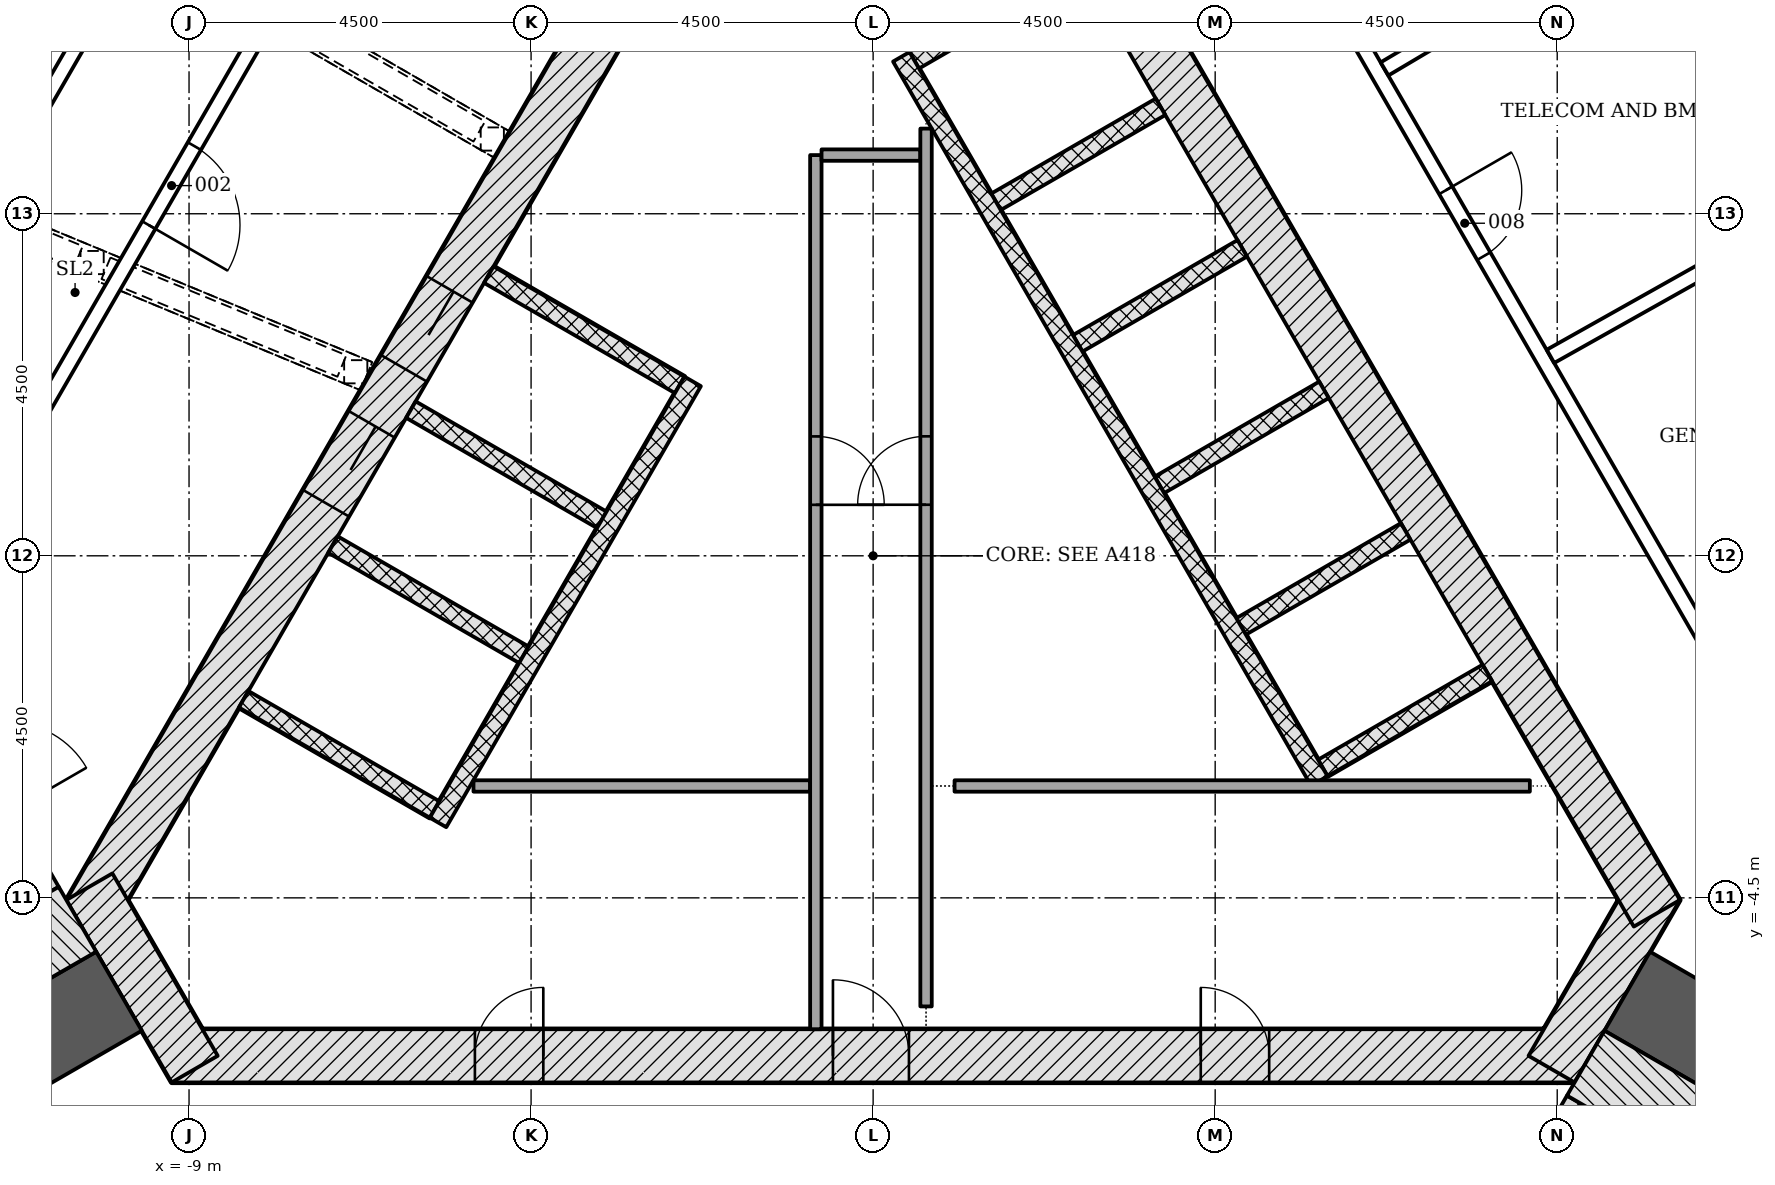
"""IFC4 building model, lengths in metres.
Left out: names, types, materials, properties, quantities, classifications, styles, units other than length and angle.
Written with IfcOpenShell. Run it as: python <this file> out.ifc"""

import sys

from ifc_helpers import new_model, si_unit, direction, frame, frame_2d, origin, place, context, subcontext, project, spatial, rectangle, extrude, element, fill, save


model = new_model("IFC4")
c1 = context("Model", 3, precision=1e-05, world=origin(), true_north=direction((0.0, 1.0)))
c2 = subcontext(c1, "Body", "Model", "MODEL_VIEW")
j1 = project(units=[si_unit("LENGTHUNIT", "METRE"), si_unit("PLANEANGLEUNIT", "RADIAN")], contexts=[c1])
p1 = place(None, origin())
s1 = spatial("IfcSite", under=j1, at=p1, CompositionType="ELEMENT")
p2 = place(p1, origin())
s2 = spatial("IfcBuilding", under=s1, at=p2, CompositionType="ELEMENT")
p3 = place(p2, frame((0.0, 0.0, 258.0)))
s3 = spatial("IfcBuildingStorey", under=s2, at=p3, CompositionType="ELEMENT", Elevation=258.0)
p4 = place(p3, frame((-9.229, -6.578, -0.3), z_axis=(0.0, 0.0, 1.0), x_axis=(1.0, 0.0, 0.0)))
e1 = element("IfcWall", 1, at=p4, inside=s3, PredefinedType="SHEAR", context=c2, shape_type="SweptSolid", body=[
    extrude(rectangle(XDim=18.458, YDim=0.7, at=frame_2d((9.229, 0.0))), origin(), (0.0, 0.0, 1.0), 5.5),
])
p5 = place(p4, frame((8.7, 0.0, 0.3)))
e2 = element("IfcOpeningElement", 2, at=p5, cuts=e1, PredefinedType="OPENING", context=c2, shape_type="SweptSolid", body=[
    extrude(rectangle(XDim=1.0, YDim=2.1, at=frame_2d((0.5, 1.05))), frame((0.0, 0.36, 0.0), z_axis=(0.0, -1.0, 0.0), x_axis=(1.0, 0.0, 0.0)), (0.0, 0.0, 1.0), 0.72),
])
p6 = place(p4, frame((3.99, 0.0, 0.3)))
e3 = element("IfcOpeningElement", 3, at=p6, cuts=e1, PredefinedType="OPENING", context=c2, shape_type="SweptSolid", body=[
    extrude(rectangle(XDim=0.9, YDim=2.1, at=frame_2d((0.45, 1.05))), frame((0.0, 0.36, 0.0), z_axis=(0.0, -1.0, 0.0), x_axis=(1.0, 0.0, 0.0)), (0.0, 0.0, 1.0), 0.72),
])
p7 = place(p4, frame((13.539, 0.0, 0.3)))
e4 = element("IfcOpeningElement", 4, at=p7, cuts=e1, PredefinedType="OPENING", context=c2, shape_type="SweptSolid", body=[
    extrude(rectangle(XDim=0.9, YDim=2.1, at=frame_2d((0.45, 1.05))), frame((0.0, 0.36, 0.0), z_axis=(0.0, -1.0, 0.0), x_axis=(1.0, 0.0, 0.0)), (0.0, 0.0, 1.0), 0.72),
])
p8 = place(p3, frame((8.926, -6.753, -0.3), z_axis=(0.0, 0.0, 1.0), x_axis=(0.500042739161, 0.866000726912, 0.0)))
e5 = element("IfcWall", 5, at=p8, inside=s3, PredefinedType="SHEAR", context=c2, shape_type="SweptSolid", body=[
    extrude(rectangle(XDim=2.771, YDim=0.7, at=frame_2d((1.386, 0.0))), origin(), (0.0, 0.0, 1.0), 5.5),
])
p9 = place(p3, frame((10.311, -4.703, -0.3), z_axis=(0.0, 0.0, 1.0), x_axis=(-0.500001446645, 0.866024568562, 0.0)))
e6 = element("IfcWall", 6, at=p9, inside=s3, PredefinedType="SHEAR", context=c2, shape_type="SweptSolid", body=[
    extrude(rectangle(XDim=18.458, YDim=0.7, at=frame_2d((9.229, 0.0))), origin(), (0.0, 0.0, 1.0), 5.5),
])
p10 = place(p3, frame((-1.083, 11.281, -0.3), z_axis=(0.0, 0.0, 1.0), x_axis=(-0.500001446645, -0.866024568562, 0.0)))
e7 = element("IfcWall", 7, at=p10, inside=s3, PredefinedType="SHEAR", context=c2, shape_type="SweptSolid", body=[
    extrude(rectangle(XDim=18.458, YDim=0.7, at=frame_2d((9.229, 0.0))), origin(), (0.0, 0.0, 1.0), 5.5),
])
p11 = place(p10, frame((8.979, 0.0, 0.3)))
e8 = element("IfcOpeningElement", 8, at=p11, cuts=e7, PredefinedType="OPENING", context=c2, shape_type="SweptSolid", body=[
    extrude(rectangle(XDim=1.2, YDim=2.1, at=frame_2d((0.6, 1.05))), frame((0.0, 0.36, 0.0), z_axis=(0.0, -1.0, 0.0), x_axis=(1.0, 0.0, 0.0)), (0.0, 0.0, 1.0), 0.72),
])
p12 = place(p10, frame((11.029, 0.0, 0.3)))
e9 = element("IfcOpeningElement", 9, at=p12, cuts=e7, PredefinedType="OPENING", context=c2, shape_type="SweptSolid", body=[
    extrude(rectangle(XDim=1.2, YDim=2.1, at=frame_2d((0.6, 1.05))), frame((0.0, 0.36, 0.0), z_axis=(0.0, -1.0, 0.0), x_axis=(1.0, 0.0, 0.0)), (0.0, 0.0, 1.0), 0.72),
])
p13 = place(p3, frame((-10.311, -4.353, -0.3), z_axis=(0.0, 0.0, 1.0), x_axis=(0.500042739161, -0.866000726912, 0.0)))
e10 = element("IfcWall", 10, at=p13, inside=s3, PredefinedType="SHEAR", context=c2, shape_type="SweptSolid", body=[
    extrude(rectangle(XDim=2.771, YDim=0.7, at=frame_2d((1.386, 0.0))), origin(), (0.0, 0.0, 1.0), 5.5),
])
for number, where, z_axis, x_axis in (
    (11, (-9.922, -5.728, -0.3), (0.0, 0.0, 1.0), (-0.866, -0.5, 0.0)),
    (12, (9.922, -5.728, -0.3), (0.0, 0.0, 1.0), (0.866, -0.5, 0.0)),
):
    element("IfcWall", number, at=place(p3, frame(where, z_axis=z_axis, x_axis=x_axis)), inside=s3, PredefinedType="SHEAR", context=c2, shape_type="SweptSolid", body=[
        extrude(rectangle(XDim=6.678, YDim=1.2, at=frame_2d((3.339, 0.0))), origin(), (0.0, 0.0, 1.0), 5.5),
    ])
for number, where, z_axis, x_axis in (
    (13, (8.081, -1.541, -0.3), (0.0, 0.0, 1.0), (-0.866, -0.5, 0.0)),
    (14, (7.006, 0.321, -0.3), (0.0, 0.0, 1.0), (-0.866, -0.5, 0.0)),
):
    element("IfcWall", number, at=place(p3, frame(where, z_axis=z_axis, x_axis=x_axis)), inside=s3, PredefinedType="PARTITIONING", context=c2, shape_type="SweptSolid", body=[
        extrude(rectangle(XDim=2.5, YDim=0.25, at=frame_2d((1.25, 0.0))), origin(), (0.0, 0.0, 1.0), 5.5),
    ])
p14 = place(p3, frame((5.931, 2.183, -0.3), z_axis=(0.0, 0.0, 1.0), x_axis=(-0.866047370643, -0.499961950354, 0.0)))
e15 = element("IfcWall", 15, at=p14, inside=s3, PredefinedType="PARTITIONING", context=c2, shape_type="SweptSolid", body=[
    extrude(rectangle(XDim=2.5, YDim=0.25, at=frame_2d((1.25, 0.0))), origin(), (0.0, 0.0, 1.0), 5.5),
])
for number, where, z_axis, x_axis in (
    (16, (4.856, 4.045, -0.3), (0.0, 0.0, 1.0), (-0.866, -0.5, 0.0)),
    (17, (3.781, 5.907, -0.3), (0.0, 0.0, 1.0), (-0.866, -0.5, 0.0)),
    (18, (2.706, 7.769, -0.3), (0.0, 0.0, 1.0), (-0.866, -0.5, 0.0)),
):
    element("IfcWall", number, at=place(p3, frame(where, z_axis=z_axis, x_axis=x_axis)), inside=s3, PredefinedType="PARTITIONING", context=c2, shape_type="SweptSolid", body=[
        extrude(rectangle(XDim=2.5, YDim=0.25, at=frame_2d((1.25, 0.0))), origin(), (0.0, 0.0, 1.0), 5.5),
    ])
p15 = place(p3, frame((5.87, -2.961, 0.0), z_axis=(0.0, 0.0, 1.0), x_axis=(-0.50000615651, 0.866021849293, 0.0)))
e19 = element("IfcWall", 19, at=p15, inside=s3, PredefinedType="PARTITIONING", context=c2, shape_type="SweptSolid", body=[
    extrude(rectangle(XDim=11.0, YDim=0.25, at=frame_2d((5.5, 0.0))), origin(), (0.0, 0.0, 1.0), 5.2),
])
for number, where, z_axis, x_axis in (
    (20, (-5.056, 3.699, -0.3), (0.0, 0.0, 1.0), (0.866, -0.5, 0.0)),
    (21, (-6.081, 1.923, -0.3), (0.0, 0.0, 1.0), (0.866, -0.5, 0.0)),
    (22, (-7.106, 0.148, -0.3), (0.0, 0.0, 1.0), (0.866, -0.5, 0.0)),
    (23, (-8.281, -1.887, -0.3), (0.0, 0.0, 1.0), (0.866, -0.5, 0.0)),
):
    element("IfcWall", number, at=place(p3, frame(where, z_axis=z_axis, x_axis=x_axis)), inside=s3, PredefinedType="PARTITIONING", context=c2, shape_type="SweptSolid", body=[
        extrude(rectangle(XDim=2.9, YDim=0.25, at=frame_2d((1.45, 0.0))), origin(), (0.0, 0.0, 1.0), 5.5),
    ])
p16 = place(p3, frame((-2.374, 2.294, 0.0), z_axis=(0.0, 0.0, 1.0), x_axis=(-0.500003174267, -0.866023571113, 0.0)))
e24 = element("IfcWall", 24, at=p16, inside=s3, PredefinedType="PARTITIONING", context=c2, shape_type="SweptSolid", body=[
    extrude(rectangle(XDim=6.7, YDim=0.25, at=frame_2d((3.35, 0.0))), origin(), (0.0, 0.0, 1.0), 5.2),
])
p17 = place(p3, frame((-5.258, -3.028, 0.0), z_axis=(0.0, 0.0, 1.0), x_axis=(1.0, 0.0, 0.0)))
e25 = element("IfcWall", 25, at=p17, inside=s3, PredefinedType="PARTITIONING", context=c2, shape_type="SweptSolid", body=[
    extrude(rectangle(XDim=4.429, YDim=0.15, at=frame_2d((2.215, 0.0))), origin(), (0.0, 0.0, 1.0), 5.2),
])
p18 = place(p3, frame((-0.754, 5.272, 0.0), z_axis=(0.0, 0.0, 1.0), x_axis=(0.0, -1.0, 0.0)))
e26 = element("IfcWall", 26, at=p18, inside=s3, PredefinedType="PARTITIONING", context=c2, shape_type="SweptSolid", body=[
    extrude(rectangle(XDim=11.5, YDim=0.15, at=frame_2d((5.75, 0.0))), origin(), (0.0, 0.0, 1.0), 5.2),
])
p19 = place(p18, frame((3.701, 0.0, 0.0)))
e27 = element("IfcOpeningElement", 27, at=p19, cuts=e26, PredefinedType="OPENING", context=c2, shape_type="SweptSolid", body=[
    extrude(rectangle(XDim=0.9, YDim=2.1, at=frame_2d((0.45, 1.05))), frame((0.0, 0.085, 0.0), z_axis=(0.0, -1.0, 0.0), x_axis=(1.0, 0.0, 0.0)), (0.0, 0.0, 1.0), 0.17),
])
p20 = place(p3, frame((-0.679, 5.272, 0.0), z_axis=(0.0, 0.0, 1.0), x_axis=(1.0, 0.0, 0.0)))
e28 = element("IfcWall", 28, at=p20, inside=s3, PredefinedType="PARTITIONING", context=c2, shape_type="SweptSolid", body=[
    extrude(rectangle(XDim=1.3, YDim=0.15, at=frame_2d((0.65, 0.0))), origin(), (0.0, 0.0, 1.0), 5.2),
])
p21 = place(p3, frame((0.696, -5.928, 0.0), z_axis=(0.0, 0.0, 1.0), x_axis=(0.0, 1.0, 0.0)))
e29 = element("IfcWall", 29, at=p21, inside=s3, PredefinedType="PARTITIONING", context=c2, shape_type="SweptSolid", body=[
    extrude(rectangle(XDim=11.549, YDim=0.15, at=frame_2d((5.774, 0.0))), origin(), (0.0, 0.0, 1.0), 5.2),
])
p22 = place(p21, frame((6.6, 0.0, 0.0)))
e30 = element("IfcOpeningElement", 30, at=p22, cuts=e29, PredefinedType="OPENING", context=c2, shape_type="SweptSolid", body=[
    extrude(rectangle(XDim=0.9, YDim=2.1, at=frame_2d((0.45, 1.05))), frame((0.0, 0.085, 0.0), z_axis=(0.0, -1.0, 0.0), x_axis=(1.0, 0.0, 0.0)), (0.0, 0.0, 1.0), 0.17),
])
p23 = place(p3, frame((1.071, -3.028, 0.0), z_axis=(0.0, 0.0, 1.0), x_axis=(1.0, 0.0, 0.0)))
e31 = element("IfcWall", 31, at=p23, inside=s3, PredefinedType="PARTITIONING", context=c2, shape_type="SweptSolid", body=[
    extrude(rectangle(XDim=7.569, YDim=0.15, at=frame_2d((3.784, 0.0))), origin(), (0.0, 0.0, 1.0), 5.2),
])
p24 = place(p3, frame((-12.576, -1.331, -0.3), z_axis=(0.0, 0.0, 1.0), x_axis=(0.499970499736, -0.8660424351, 0.0)))
e32 = element("IfcWall", 32, at=p24, inside=s3, PredefinedType="SHEAR", context=c2, shape_type="SweptSolid", body=[
    extrude(rectangle(XDim=3.55, YDim=0.2, at=frame_2d((1.775, 0.0))), origin(), (0.0, 0.0, 1.0), 5.5),
])
p25 = place(p24, frame((1.175, 0.0, 0.3)))
e33 = element("IfcOpeningElement", 33, at=p25, cuts=e32, PredefinedType="OPENING", context=c2, shape_type="SweptSolid", body=[
    extrude(rectangle(XDim=1.2, YDim=2.1, at=frame_2d((0.6, 1.05))), frame((0.0, 0.11, 0.0), z_axis=(0.0, -1.0, 0.0), x_axis=(1.0, 0.0, 0.0)), (0.0, 0.0, 1.0), 0.22),
])
p26 = place(p3, frame((-10.468, -4.782, -0.3), z_axis=(0.0, 0.0, 1.0), x_axis=(-0.866016347338, -0.500015685897, 0.0)))
e34 = element("IfcWall", 34, at=p26, inside=s3, PredefinedType="SHEAR", context=c2, shape_type="SweptSolid", body=[
    extrude(rectangle(XDim=6.678, YDim=0.986, at=frame_2d((3.339, 0.0))), origin(), (0.0, 0.0, 1.0), 5.5),
])
p27 = place(p3, frame((7.44, -10.226, -0.3), z_axis=(0.0, 0.0, 1.0), x_axis=(0.500022077904, 0.866012656725, 0.0)))
e35 = element("IfcWall", 35, at=p27, inside=s3, PredefinedType="SHEAR", context=c2, shape_type="SweptSolid", body=[
    extrude(rectangle(XDim=3.55, YDim=0.2, at=frame_2d((1.775, 0.0))), origin(), (0.0, 0.0, 1.0), 5.5),
])
p28 = place(p27, frame((1.175, 0.0, 0.3)))
e36 = element("IfcOpeningElement", 36, at=p28, cuts=e35, PredefinedType="OPENING", context=c2, shape_type="SweptSolid", body=[
    extrude(rectangle(XDim=1.2, YDim=2.1, at=frame_2d((0.6, 1.05))), frame((0.0, 0.11, 0.0), z_axis=(0.0, -1.0, 0.0), x_axis=(1.0, 0.0, 0.0)), (0.0, 0.0, 1.0), 0.22),
])
p29 = place(p3, frame((9.375, -6.675, -0.3), z_axis=(0.0, 0.0, 1.0), x_axis=(0.866025486527, -0.499999856685, 0.0)))
e37 = element("IfcWall", 37, at=p29, inside=s3, PredefinedType="SHEAR", context=c2, shape_type="SweptSolid", body=[
    extrude(rectangle(XDim=6.679, YDim=0.986, at=frame_2d((3.339, 0.0))), origin(), (0.0, 0.0, 1.0), 5.5),
])
p30 = place(p3, frame((-1.287, 18.628, 0.0), z_axis=(0.0, 0.0, 1.0), x_axis=(-0.499998747105, -0.866026127143, 0.0)))
e38 = element("IfcWall", 38, at=p30, inside=s3, PredefinedType="PARTITIONING", context=c2, shape_type="SweptSolid", body=[
    extrude(rectangle(XDim=22.743, YDim=0.2, at=frame_2d((11.371, 0.0))), origin(), (0.0, 0.0, 1.0), 4.652),
])
p31 = place(p30, frame((15.286, 0.0, 0.0)))
e39 = element("IfcOpeningElement", 39, at=p31, cuts=e38, PredefinedType="OPENING", context=c2, shape_type="SweptSolid", body=[
    extrude(rectangle(XDim=1.2, YDim=2.1, at=frame_2d((0.6, 1.05))), frame((0.0, 0.11, 0.0), z_axis=(0.0, -1.0, 0.0), x_axis=(1.0, 0.0, 0.0)), (0.0, 0.0, 1.0), 0.22),
])
p32 = place(p3, frame((-16.104, -3.037, 0.0), z_axis=(0.0, 0.0, 1.0), x_axis=(0.500001441734, 0.866024571397, 0.0)))
e40 = element("IfcWall", 40, at=p32, inside=s3, PredefinedType="PARTITIONING", context=c2, shape_type="SweptSolid", body=[
    extrude(rectangle(XDim=26.765, YDim=0.2, at=frame_2d((13.383, 0.0))), origin(), (0.0, 0.0, 1.0), 4.652),
])
p33 = place(p32, frame((16.004, 0.0, 0.0)))
e41 = element("IfcOpeningElement", 41, at=p33, cuts=e40, PredefinedType="OPENING", context=c2, shape_type="SweptSolid", body=[
    extrude(rectangle(XDim=1.0, YDim=2.1, at=frame_2d((0.5, 1.05))), frame((0.0, 0.11, 0.0), z_axis=(0.0, -1.0, 0.0), x_axis=(1.0, 0.0, 0.0)), (0.0, 0.0, 1.0), 0.22),
])
p34 = place(p3, frame((5.282, 8.708, 0.0), z_axis=(0.0, 0.0, 1.0), x_axis=(0.500007704848, -0.866020955343, 0.0)))
e42 = element("IfcWall", 42, at=p34, inside=s3, PredefinedType="PARTITIONING", context=c2, shape_type="SweptSolid", body=[
    extrude(rectangle(XDim=18.991, YDim=0.2, at=frame_2d((9.496, 0.0))), origin(), (0.0, 0.0, 1.0), 4.652),
])
p35 = place(p34, frame((12.521, 0.0, 0.0)))
e43 = element("IfcOpeningElement", 43, at=p35, cuts=e42, PredefinedType="OPENING", context=c2, shape_type="SweptSolid", body=[
    extrude(rectangle(XDim=1.0, YDim=2.1, at=frame_2d((0.5, 1.05))), frame((0.0, 0.11, 0.0), z_axis=(0.0, -1.0, 0.0), x_axis=(1.0, 0.0, 0.0)), (0.0, 0.0, 1.0), 0.22),
])
p36 = place(p34, frame((4.502, 0.0, 0.0)))
e44 = element("IfcOpeningElement", 44, at=p36, cuts=e42, PredefinedType="OPENING", context=c2, shape_type="SweptSolid", body=[
    extrude(rectangle(XDim=1.0, YDim=2.1, at=frame_2d((0.5, 1.05))), frame((0.0, 0.11, 0.0), z_axis=(0.0, -1.0, 0.0), x_axis=(1.0, 0.0, 0.0)), (0.0, 0.0, 1.0), 0.22),
])
p37 = place(p34, frame((0.965, 0.0, 0.0)))
e45 = element("IfcOpeningElement", 45, at=p37, cuts=e42, PredefinedType="OPENING", context=c2, shape_type="SweptSolid", body=[
    extrude(rectangle(XDim=1.0, YDim=2.1, at=frame_2d((0.5, 1.05))), frame((0.0, 0.11, 0.0), z_axis=(0.0, -1.0, 0.0), x_axis=(1.0, 0.0, 0.0)), (0.0, 0.0, 1.0), 0.22),
])
for number, where, z_axis, x_axis in (
    (46, (8.911, 2.624, 0.0), (0.0, 0.0, 1.0), (0.872, 0.49, 0.0)),
    (47, (6.728, 6.406, 0.0), (0.0, 0.0, 1.0), (0.86, 0.51, 0.0)),
):
    element("IfcWall", number, at=place(p3, frame(where, z_axis=z_axis, x_axis=x_axis)), inside=s3, PredefinedType="PARTITIONING", context=c2, shape_type="SweptSolid", body=[
        extrude(rectangle(XDim=5.044, YDim=0.2, at=frame_2d((2.522, 0.0))), origin(), (0.0, 0.0, 1.0), 4.652),
    ])
p38 = place(p11, origin())
e48 = element("IfcDoor", 48, at=p38, inside=s3, OperationType="DOUBLE_DOOR_SLIDING", PredefinedType="DOOR", context=c2, shape_type="SweptSolid", body=[
    extrude(rectangle(XDim=1.2, YDim=2.1, at=frame_2d((0.6, 1.05))), frame((0.0, 0.025, 0.0), z_axis=(0.0, -1.0, 0.0), x_axis=(1.0, 0.0, 0.0)), (0.0, 0.0, 1.0), 0.05),
])
fill(e8, e48)
p39 = place(p12, origin())
e49 = element("IfcDoor", 49, at=p39, inside=s3, OperationType="DOUBLE_DOOR_SLIDING", PredefinedType="DOOR", context=c2, shape_type="SweptSolid", body=[
    extrude(rectangle(XDim=1.2, YDim=2.1, at=frame_2d((0.6, 1.05))), frame((0.0, 0.025, 0.0), z_axis=(0.0, -1.0, 0.0), x_axis=(1.0, 0.0, 0.0)), (0.0, 0.0, 1.0), 0.05),
])
fill(e9, e49)
p40 = place(p5, origin())
e50 = element("IfcDoor", 50, at=p40, inside=s3, OperationType="SINGLE_SWING_LEFT", PredefinedType="DOOR", context=c2, shape_type="SweptSolid", body=[
    extrude(rectangle(XDim=1.0, YDim=2.1, at=frame_2d((0.5, 1.05))), frame((0.0, 0.075, 0.0), z_axis=(0.0, -1.0, 0.0), x_axis=(1.0, 0.0, 0.0)), (0.0, 0.0, 1.0), 0.15),
])
fill(e2, e50)
p41 = place(p6, origin())
e51 = element("IfcDoor", 51, at=p41, inside=s3, OperationType="SINGLE_SWING_RIGHT", PredefinedType="DOOR", context=c2, shape_type="SweptSolid", body=[
    extrude(rectangle(XDim=0.9, YDim=2.1, at=frame_2d((0.45, 1.05))), frame((0.0, 0.075, 0.0), z_axis=(0.0, -1.0, 0.0), x_axis=(1.0, 0.0, 0.0)), (0.0, 0.0, 1.0), 0.15),
])
fill(e3, e51)
p42 = place(p7, origin())
e52 = element("IfcDoor", 52, at=p42, inside=s3, OperationType="SINGLE_SWING_LEFT", PredefinedType="DOOR", context=c2, shape_type="SweptSolid", body=[
    extrude(rectangle(XDim=0.9, YDim=2.1, at=frame_2d((0.45, 1.05))), frame((0.0, 0.075, 0.0), z_axis=(0.0, -1.0, 0.0), x_axis=(1.0, 0.0, 0.0)), (0.0, 0.0, 1.0), 0.15),
])
fill(e4, e52)
p43 = place(p19, origin())
e53 = element("IfcDoor", 53, at=p43, inside=s3, OperationType="SINGLE_SWING_RIGHT", PredefinedType="DOOR", context=c2, shape_type="SweptSolid", body=[
    extrude(rectangle(XDim=0.9, YDim=2.1, at=frame_2d((0.45, 1.05))), frame((0.0, 0.025, 0.0), z_axis=(0.0, -1.0, 0.0), x_axis=(1.0, 0.0, 0.0)), (0.0, 0.0, 1.0), 0.05),
])
fill(e27, e53)
p44 = place(p22, origin())
e54 = element("IfcDoor", 54, at=p44, inside=s3, OperationType="SINGLE_SWING_LEFT", PredefinedType="DOOR", context=c2, shape_type="SweptSolid", body=[
    extrude(rectangle(XDim=0.9, YDim=2.1, at=frame_2d((0.45, 1.05))), frame((0.0, 0.025, 0.0), z_axis=(0.0, -1.0, 0.0), x_axis=(1.0, 0.0, 0.0)), (0.0, 0.0, 1.0), 0.05),
])
fill(e30, e54)
p45 = place(p31, origin())
e55 = element("IfcDoor", 55, at=p45, inside=s3, OperationType="SINGLE_SWING_RIGHT", PredefinedType="DOOR", context=c2, shape_type="SweptSolid", body=[
    extrude(rectangle(XDim=1.2, YDim=2.1, at=frame_2d((0.6, 1.05))), frame((0.0, 0.025, 0.0), z_axis=(0.0, -1.0, 0.0), x_axis=(1.0, 0.0, 0.0)), (0.0, 0.0, 1.0), 0.05),
])
fill(e39, e55)
p46 = place(p36, origin())
e56 = element("IfcDoor", 56, at=p46, inside=s3, OperationType="SINGLE_SWING_LEFT", PredefinedType="DOOR", context=c2, shape_type="SweptSolid", body=[
    extrude(rectangle(XDim=1.0, YDim=2.1, at=frame_2d((0.5, 1.05))), frame((0.0, 0.025, 0.0), z_axis=(0.0, -1.0, 0.0), x_axis=(1.0, 0.0, 0.0)), (0.0, 0.0, 1.0), 0.05),
])
fill(e44, e56)
save(model, sys.argv[1])
